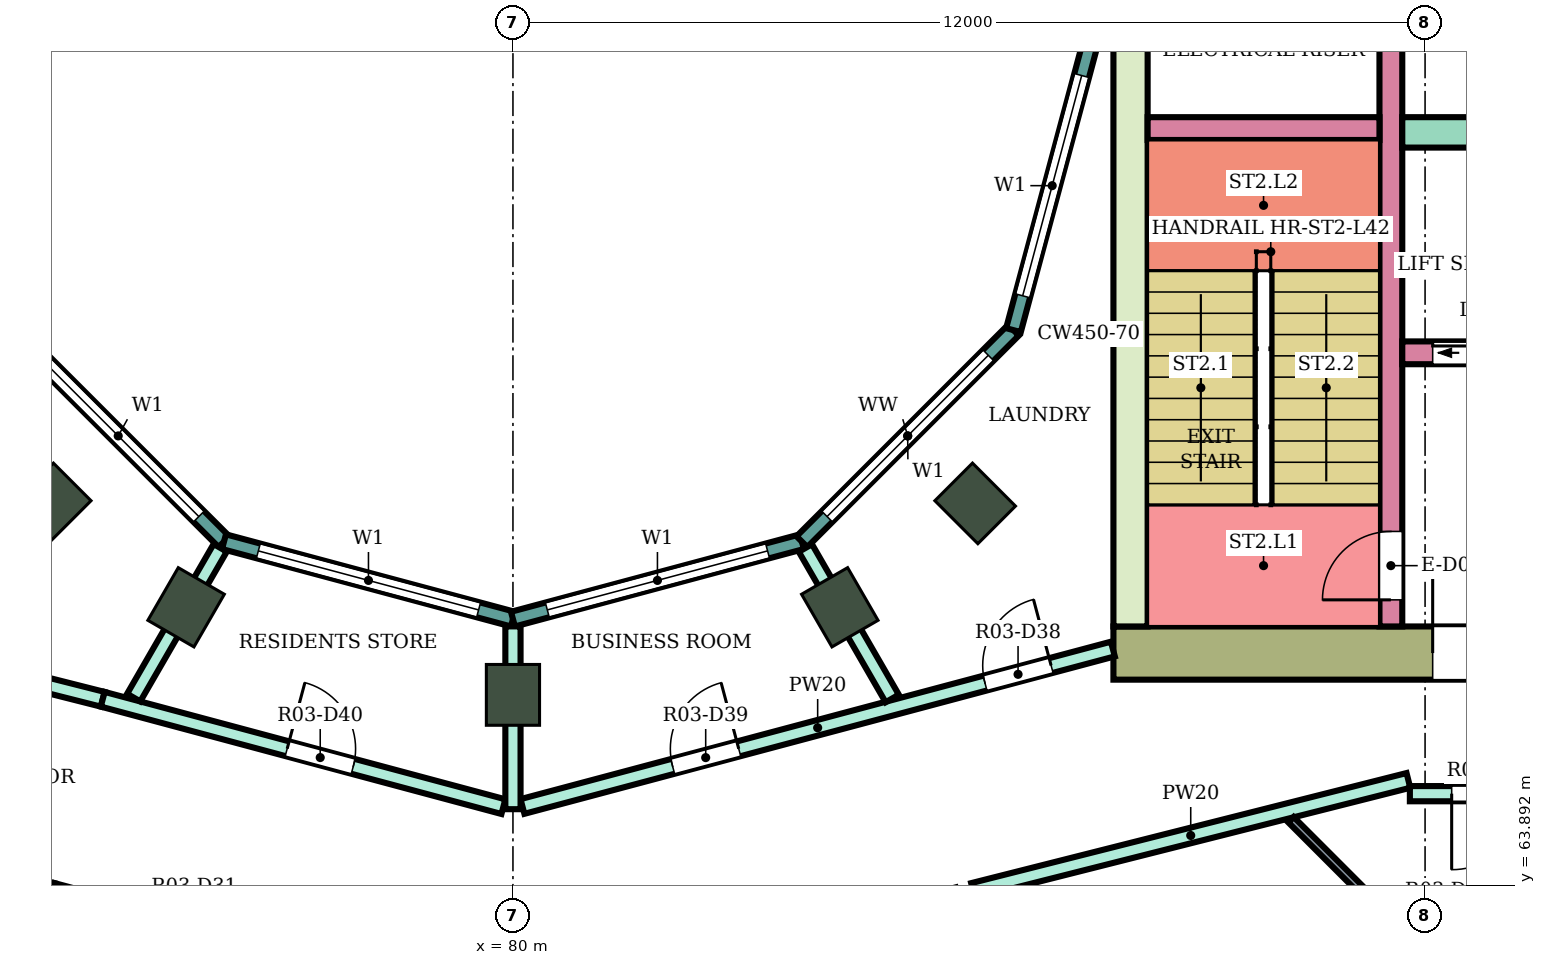
"""IFC4 building model, lengths in metres.
Left out: names, types, materials, properties, quantities, classifications, styles, units other than length and angle.
Written with IfcOpenShell. Run it as: python <this file> out.ifc"""

import sys

from ifc_helpers import new_model, si_unit, direction, frame, frame_2d, origin, origin_2d, place, context, subcontext, project, spatial, rectangle, extrude, element, fill, save


model = new_model("IFC4")
c1 = context("Model", 3, precision=1e-05, world=origin(), true_north=direction((0.0, 1.0)))
c2 = subcontext(c1, "Body", "Model", "MODEL_VIEW")
j1 = project(units=[si_unit("LENGTHUNIT", "METRE"), si_unit("PLANEANGLEUNIT", "RADIAN")], contexts=[c1])
p1 = place(None, origin())
s1 = spatial("IfcSite", under=j1, at=p1, CompositionType="ELEMENT")
p2 = place(p1, origin())
s2 = spatial("IfcBuilding", under=s1, at=p2, CompositionType="ELEMENT")
p3 = place(p2, frame((0.0, 0.0, 182.3)))
s3 = spatial("IfcBuildingStorey", under=s2, at=p3, CompositionType="ELEMENT", Elevation=182.3)
for number, where, z_axis, x_axis in (
    (1, (73.919, 68.919, 0.0), (0.0, 0.0, 1.0), (-0.707, -0.707, 0.0)),
    (2, (75.7, 67.552, 0.0), (0.0, 0.0, 1.0), (-0.5, -0.866, 0.0)),
    (3, (80.0, 66.4, 0.0), (0.0, 0.0, 1.0), (0.0, -1.0, 0.0)),
    (4, (84.3, 67.552, 0.0), (0.0, 0.0, 1.0), (0.5, -0.866, 0.0)),
    (5, (86.081, 68.919, 0.0), (0.0, 0.0, 1.0), (0.707, -0.707, 0.0)),
):
    element("IfcColumn", number, at=place(p3, frame(where, z_axis=z_axis, x_axis=x_axis)), inside=s3, PredefinedType="COLUMN", context=c2, shape_type="SweptSolid", body=[
        extrude(rectangle(XDim=0.8, YDim=0.7, at=origin_2d()), origin(), (0.0, 0.0, 1.0), 4.1),
    ])
p4 = place(p3, frame((87.9, 66.95, 0.0), z_axis=(0.0, 0.0, 1.0), x_axis=(1.0, 0.0, 0.0)))
e6 = element("IfcWall", 6, at=p4, inside=s3, PredefinedType="SHEAR", context=c2, shape_type="SweptSolid", body=[
    extrude(rectangle(XDim=14.8, YDim=0.7, at=frame_2d((7.4, 0.0))), origin(), (0.0, 0.0, 1.0), 3.78),
])
p5 = place(p4, frame((4.2, 0.0, 0.0)))
e7 = element("IfcOpeningElement", 7, at=p5, cuts=e6, PredefinedType="OPENING", context=c2, shape_type="SweptSolid", body=[
    extrude(rectangle(XDim=2.4, YDim=2.4, at=frame_2d((1.2, 1.2))), frame((0.0, 0.36, 0.0), z_axis=(0.0, -1.0, 0.0), x_axis=(1.0, 0.0, 0.0)), (0.0, 0.0, 1.0), 0.72),
])
p6 = place(p3, frame((88.125, 67.3, 0.0), z_axis=(0.0, 0.0, 1.0), x_axis=(0.0, 1.0, 0.0)))
e8 = element("IfcWall", 8, at=p6, inside=s3, PredefinedType="SHEAR", context=c2, shape_type="SweptSolid", body=[
    extrude(rectangle(XDim=7.7, YDim=0.45, at=frame_2d((3.85, 0.0))), origin(), (0.0, 0.0, 1.0), 3.78),
])
p7 = place(p3, frame((91.55, 67.3, 0.0), z_axis=(0.0, 0.0, 1.0), x_axis=(0.0, 1.0, 0.0)))
e9 = element("IfcWall", 9, at=p7, inside=s3, PredefinedType="SHEAR", context=c2, shape_type="SweptSolid", body=[
    extrude(rectangle(XDim=7.7, YDim=0.3, at=frame_2d((3.85, 0.0))), origin(), (0.0, 0.0, 1.0), 3.78),
])
p8 = place(p7, frame((0.35, 0.0, 0.0)))
e10 = element("IfcOpeningElement", 10, at=p8, cuts=e9, PredefinedType="OPENING", context=c2, shape_type="SweptSolid", body=[
    extrude(rectangle(XDim=0.9, YDim=2.1, at=frame_2d((0.45, 1.05))), frame((0.0, 0.16, 0.0), z_axis=(0.0, -1.0, 0.0), x_axis=(1.0, 0.0, 0.0)), (0.0, 0.0, 1.0), 0.32),
])
p9 = place(p3, frame((88.35, 73.85, 0.0), z_axis=(0.0, 0.0, 1.0), x_axis=(1.0, 0.0, 0.0)))
e11 = element("IfcWall", 11, at=p9, inside=s3, PredefinedType="SHEAR", context=c2, shape_type="SweptSolid", body=[
    extrude(rectangle(XDim=3.05, YDim=0.3, at=frame_2d((1.525, 0.0))), origin(), (0.0, 0.0, 1.0), 3.78),
])
p10 = place(p3, frame((91.7, 73.8, 0.0), z_axis=(0.0, 0.0, 1.0), x_axis=(1.0, 0.0, 0.0)))
e12 = element("IfcWall", 12, at=p10, inside=s3, PredefinedType="SHEAR", context=c2, shape_type="SweptSolid", body=[
    extrude(rectangle(XDim=11.0, YDim=0.4, at=frame_2d((5.5, 0.0))), origin(), (0.0, 0.0, 1.0), 3.78),
])
p11 = place(p3, frame((91.7, 70.9, 0.0), z_axis=(0.0, 0.0, 1.0), x_axis=(1.0, 0.0, 0.0)))
e13 = element("IfcWall", 13, at=p11, inside=s3, PredefinedType="SHEAR", context=c2, shape_type="SweptSolid", body=[
    extrude(rectangle(XDim=11.0, YDim=0.3, at=frame_2d((5.5, 0.0))), origin(), (0.0, 0.0, 1.0), 3.78),
])
p12 = place(p11, frame((0.4, 0.0, 0.0)))
e14 = element("IfcOpeningElement", 14, at=p12, cuts=e13, PredefinedType="OPENING", context=c2, shape_type="SweptSolid", body=[
    extrude(rectangle(XDim=1.4, YDim=2.1, at=frame_2d((0.7, 1.05))), frame((0.0, 0.16, 0.0), z_axis=(0.0, -1.0, 0.0), x_axis=(1.0, 0.0, 0.0)), (0.0, 0.0, 1.0), 0.32),
])
p13 = place(p11, frame((3.0, 0.0, 0.0)))
e15 = element("IfcOpeningElement", 15, at=p13, cuts=e13, PredefinedType="OPENING", context=c2, shape_type="SweptSolid", body=[
    extrude(rectangle(XDim=1.2, YDim=2.1, at=frame_2d((0.6, 1.05))), frame((0.0, 0.16, 0.0), z_axis=(0.0, -1.0, 0.0), x_axis=(1.0, 0.0, 0.0)), (0.0, 0.0, 1.0), 0.32),
])
p14 = place(p11, frame((5.55, 0.0, 0.0)))
e16 = element("IfcOpeningElement", 16, at=p14, cuts=e13, PredefinedType="OPENING", context=c2, shape_type="SweptSolid", body=[
    extrude(rectangle(XDim=0.9, YDim=2.1, at=frame_2d((0.45, 1.05))), frame((0.0, 0.16, 0.0), z_axis=(0.0, -1.0, 0.0), x_axis=(1.0, 0.0, 0.0)), (0.0, 0.0, 1.0), 0.32),
])
p15 = place(p11, frame((7.55, 0.0, 0.0)))
e17 = element("IfcOpeningElement", 17, at=p15, cuts=e13, PredefinedType="OPENING", context=c2, shape_type="SweptSolid", body=[
    extrude(rectangle(XDim=0.9, YDim=2.1, at=frame_2d((0.45, 1.05))), frame((0.0, 0.16, 0.0), z_axis=(0.0, -1.0, 0.0), x_axis=(1.0, 0.0, 0.0)), (0.0, 0.0, 1.0), 0.32),
])
p16 = place(p11, frame((9.55, 0.0, 0.0)))
e18 = element("IfcOpeningElement", 18, at=p16, cuts=e13, PredefinedType="OPENING", context=c2, shape_type="SweptSolid", body=[
    extrude(rectangle(XDim=0.9, YDim=2.1, at=frame_2d((0.45, 1.05))), frame((0.0, 0.16, 0.0), z_axis=(0.0, -1.0, 0.0), x_axis=(1.0, 0.0, 0.0)), (0.0, 0.0, 1.0), 0.32),
])
p17 = place(p3, frame((73.415, 71.198, 0.0), z_axis=(0.0, 0.0, 1.0), x_axis=(0.707106781187, -0.707106781187, 0.0)))
e19 = element("IfcWall", 19, at=p17, inside=s3, PredefinedType="NOTDEFINED", context=c2, shape_type="SweptSolid", body=[
    extrude(rectangle(XDim=3.936, YDim=0.2, at=frame_2d((1.968, 0.0))), origin(), (0.0, 0.0, 1.0), 4.1),
])
p18 = place(p17, frame((0.468, 0.0, 0.9)))
e20 = element("IfcOpeningElement", 20, at=p18, cuts=e19, PredefinedType="OPENING", context=c2, shape_type="SweptSolid", body=[
    extrude(rectangle(XDim=3.0, YDim=2.3, at=frame_2d((1.5, 1.15))), frame((0.0, 0.11, 0.0), z_axis=(0.0, -1.0, 0.0), x_axis=(1.0, 0.0, 0.0)), (0.0, 0.0, 1.0), 0.22),
])
p19 = place(p3, frame((76.198, 68.415, 0.0), z_axis=(0.0, 0.0, 1.0), x_axis=(0.965933654434, -0.258789828301, 0.0)))
e21 = element("IfcWall", 21, at=p19, inside=s3, PredefinedType="NOTDEFINED", context=c2, shape_type="SweptSolid", body=[
    extrude(rectangle(XDim=3.936, YDim=0.2, at=frame_2d((1.968, 0.0))), origin(), (0.0, 0.0, 1.0), 4.1),
])
p20 = place(p19, frame((0.468, 0.0, 0.9)))
e22 = element("IfcOpeningElement", 22, at=p20, cuts=e21, PredefinedType="OPENING", context=c2, shape_type="SweptSolid", body=[
    extrude(rectangle(XDim=3.0, YDim=2.3, at=frame_2d((1.5, 1.15))), frame((0.0, 0.11, 0.0), z_axis=(0.0, -1.0, 0.0), x_axis=(1.0, 0.0, 0.0)), (0.0, 0.0, 1.0), 0.22),
])
p21 = place(p3, frame((80.0, 67.396, 0.0), z_axis=(0.0, 0.0, 1.0), x_axis=(0.965933654434, 0.258789828301, 0.0)))
e23 = element("IfcWall", 23, at=p21, inside=s3, PredefinedType="NOTDEFINED", context=c2, shape_type="SweptSolid", body=[
    extrude(rectangle(XDim=3.936, YDim=0.2, at=frame_2d((1.968, 0.0))), origin(), (0.0, 0.0, 1.0), 4.1),
])
p22 = place(p21, frame((0.468, 0.0, 0.9)))
e24 = element("IfcOpeningElement", 24, at=p22, cuts=e23, PredefinedType="OPENING", context=c2, shape_type="SweptSolid", body=[
    extrude(rectangle(XDim=3.0, YDim=2.3, at=frame_2d((1.5, 1.15))), frame((0.0, 0.11, 0.0), z_axis=(0.0, -1.0, 0.0), x_axis=(1.0, 0.0, 0.0)), (0.0, 0.0, 1.0), 0.22),
])
p23 = place(p3, frame((83.802, 68.415, 0.0), z_axis=(0.0, 0.0, 1.0), x_axis=(0.707106781187, 0.707106781187, 0.0)))
e25 = element("IfcWall", 25, at=p23, inside=s3, PredefinedType="NOTDEFINED", context=c2, shape_type="SweptSolid", body=[
    extrude(rectangle(XDim=3.936, YDim=0.2, at=frame_2d((1.968, 0.0))), origin(), (0.0, 0.0, 1.0), 4.1),
])
p24 = place(p23, frame((0.468, 0.0, 0.9)))
e26 = element("IfcOpeningElement", 26, at=p24, cuts=e25, PredefinedType="OPENING", context=c2, shape_type="SweptSolid", body=[
    extrude(rectangle(XDim=3.0, YDim=2.3, at=frame_2d((1.5, 1.15))), frame((0.0, 0.11, 0.0), z_axis=(0.0, -1.0, 0.0), x_axis=(1.0, 0.0, 0.0)), (0.0, 0.0, 1.0), 0.22),
])
p25 = place(p3, frame((86.585, 71.198, 0.0), z_axis=(0.0, 0.0, 1.0), x_axis=(0.258789828301, 0.965933654434, 0.0)))
e27 = element("IfcWall", 27, at=p25, inside=s3, PredefinedType="NOTDEFINED", context=c2, shape_type="SweptSolid", body=[
    extrude(rectangle(XDim=3.936, YDim=0.2, at=frame_2d((1.968, 0.0))), origin(), (0.0, 0.0, 1.0), 4.1),
])
p26 = place(p25, frame((0.468, 0.0, 0.9)))
e28 = element("IfcOpeningElement", 28, at=p26, cuts=e27, PredefinedType="OPENING", context=c2, shape_type="SweptSolid", body=[
    extrude(rectangle(XDim=3.0, YDim=2.3, at=frame_2d((1.5, 1.15))), frame((0.0, 0.11, 0.0), z_axis=(0.0, -1.0, 0.0), x_axis=(1.0, 0.0, 0.0)), (0.0, 0.0, 1.0), 0.22),
])
p27 = place(p3, frame((69.899, 64.85, 0.0), z_axis=(0.0, 0.0, 1.0), x_axis=(0.969429930153, -0.245368316057, 0.0)))
e29 = element("IfcWall", 29, at=p27, inside=s3, PredefinedType="PARTITIONING", context=c2, shape_type="SweptSolid", body=[
    extrude(rectangle(XDim=4.176, YDim=0.2, at=frame_2d((2.088, 0.0))), origin(), (0.0, 0.0, 1.0), 3.65),
])
p28 = place(p3, frame((72.1, 66.975, 0.0), z_axis=(0.0, 0.0, 1.0), x_axis=(0.969471314457, -0.245204752086, 0.0)))
e30 = element("IfcWall", 30, at=p28, inside=s3, PredefinedType="PARTITIONING", context=c2, shape_type="SweptSolid", body=[
    extrude(rectangle(XDim=2.582, YDim=0.2, at=frame_2d((1.291, 0.0))), origin(), (0.0, 0.0, 1.0), 3.65),
])
p29 = place(p28, frame((0.841, 0.0, 0.0)))
e31 = element("IfcOpeningElement", 31, at=p29, cuts=e30, PredefinedType="OPENING", context=c2, shape_type="SweptSolid", body=[
    extrude(rectangle(XDim=0.9, YDim=2.1, at=frame_2d((0.45, 1.05))), frame((0.0, 0.11, 0.0), z_axis=(0.0, -1.0, 0.0), x_axis=(1.0, 0.0, 0.0)), (0.0, 0.0, 1.0), 0.22),
])
p30 = place(p3, frame((73.947, 63.826, 0.0), z_axis=(0.0, 0.0, 1.0), x_axis=(0.965898432367, -0.258921258979, 0.0)))
e32 = element("IfcWall", 32, at=p30, inside=s3, PredefinedType="PARTITIONING", context=c2, shape_type="SweptSolid", body=[
    extrude(rectangle(XDim=6.217, YDim=0.2, at=frame_2d((3.108, 0.0))), origin(), (0.0, 0.0, 1.0), 3.65),
])
p31 = place(p30, frame((1.424, 0.0, 0.0)))
e33 = element("IfcOpeningElement", 33, at=p31, cuts=e32, PredefinedType="OPENING", context=c2, shape_type="SweptSolid", body=[
    extrude(rectangle(XDim=1.0, YDim=2.1, at=frame_2d((0.5, 1.05))), frame((0.0, 0.11, 0.0), z_axis=(0.0, -1.0, 0.0), x_axis=(1.0, 0.0, 0.0)), (0.0, 0.0, 1.0), 0.22),
])
p32 = place(p3, frame((74.603, 66.342, 0.0), z_axis=(0.0, 0.0, 1.0), x_axis=(0.965920893652, -0.258837453254, 0.0)))
e34 = element("IfcWall", 34, at=p32, inside=s3, PredefinedType="PARTITIONING", context=c2, shape_type="SweptSolid", body=[
    extrude(rectangle(XDim=5.458, YDim=0.2, at=frame_2d((2.729, 0.0))), origin(), (0.0, 0.0, 1.0), 3.65),
])
p33 = place(p32, frame((2.512, 0.0, 0.0)))
e35 = element("IfcOpeningElement", 35, at=p33, cuts=e34, PredefinedType="OPENING", context=c2, shape_type="SweptSolid", body=[
    extrude(rectangle(XDim=0.9, YDim=2.1, at=frame_2d((0.45, 1.05))), frame((0.0, 0.11, 0.0), z_axis=(0.0, -1.0, 0.0), x_axis=(1.0, 0.0, 0.0)), (0.0, 0.0, 1.0), 0.22),
])
p34 = place(p3, frame((75.01, 66.364, 0.0), z_axis=(0.0, 0.0, 1.0), x_axis=(0.500097042406, 0.865969369075, 0.0)))
e36 = element("IfcWall", 36, at=p34, inside=s3, PredefinedType="PARTITIONING", context=c2, shape_type="SweptSolid", body=[
    extrude(rectangle(XDim=2.275, YDim=0.2, at=frame_2d((1.138, 0.0))), origin(), (0.0, 0.0, 1.0), 3.65),
])
p35 = place(p3, frame((80.125, 64.932, 0.0), z_axis=(0.0, 0.0, 1.0), x_axis=(0.966236955806, 0.257655089674, 0.0)))
e37 = element("IfcWall", 37, at=p35, inside=s3, PredefinedType="PARTITIONING", context=c2, shape_type="SweptSolid", body=[
    extrude(rectangle(XDim=8.039, YDim=0.2, at=frame_2d((4.02, 0.0))), origin(), (0.0, 0.0, 1.0), 3.65),
])
p36 = place(p35, frame((6.298, 0.0, 0.0)))
e38 = element("IfcOpeningElement", 38, at=p36, cuts=e37, PredefinedType="OPENING", context=c2, shape_type="SweptSolid", body=[
    extrude(rectangle(XDim=0.9, YDim=2.1, at=frame_2d((0.45, 1.05))), frame((0.0, 0.11, 0.0), z_axis=(0.0, -1.0, 0.0), x_axis=(1.0, 0.0, 0.0)), (0.0, 0.0, 1.0), 0.22),
])
p37 = place(p35, frame((2.045, 0.0, 0.0)))
e39 = element("IfcOpeningElement", 39, at=p37, cuts=e37, PredefinedType="OPENING", context=c2, shape_type="SweptSolid", body=[
    extrude(rectangle(XDim=0.9, YDim=2.1, at=frame_2d((0.45, 1.05))), frame((0.0, 0.11, 0.0), z_axis=(0.0, -1.0, 0.0), x_axis=(1.0, 0.0, 0.0)), (0.0, 0.0, 1.0), 0.22),
])
p38 = place(p3, frame((80.0, 64.896, 0.0), z_axis=(0.0, 0.0, 1.0), x_axis=(0.0, 1.0, 0.0)))
e40 = element("IfcWall", 40, at=p38, inside=s3, PredefinedType="PARTITIONING", context=c2, shape_type="SweptSolid", body=[
    extrude(rectangle(XDim=2.405, YDim=0.2, at=frame_2d((1.203, 0.0))), origin(), (0.0, 0.0, 1.0), 3.65),
])
p39 = place(p3, frame((83.847, 68.332, 0.0), z_axis=(0.0, 0.0, 1.0), x_axis=(0.499953638813, -0.866052168773, 0.0)))
e41 = element("IfcWall", 41, at=p39, inside=s3, PredefinedType="PARTITIONING", context=c2, shape_type="SweptSolid", body=[
    extrude(rectangle(XDim=2.285, YDim=0.2, at=frame_2d((1.143, 0.0))), origin(), (0.0, 0.0, 1.0), 3.65),
])
p40 = place(p3, frame((86.053, 63.826, 0.0), z_axis=(0.0, 0.0, 1.0), x_axis=(0.969490004987, 0.245130843083, 0.0)))
e42 = element("IfcWall", 42, at=p40, inside=s3, PredefinedType="PARTITIONING", context=c2, shape_type="SweptSolid", body=[
    extrude(rectangle(XDim=5.908, YDim=0.2, at=frame_2d((2.954, 0.0))), origin(), (0.0, 0.0, 1.0), 3.65),
])
p41 = place(p3, frame((91.8, 65.1, 0.0), z_axis=(0.0, 0.0, 1.0), x_axis=(1.0, 0.0, 0.0)))
e43 = element("IfcWall", 43, at=p41, inside=s3, PredefinedType="PARTITIONING", context=c2, shape_type="SweptSolid", body=[
    extrude(rectangle(XDim=3.0, YDim=0.2, at=frame_2d((1.5, 0.0))), origin(), (0.0, 0.0, 1.0), 3.65),
])
p42 = place(p41, frame((0.55, 0.0, 0.0)))
e44 = element("IfcOpeningElement", 44, at=p42, cuts=e43, PredefinedType="OPENING", context=c2, shape_type="SweptSolid", body=[
    extrude(rectangle(XDim=1.0, YDim=2.1, at=frame_2d((0.5, 1.05))), frame((0.0, 0.11, 0.0), z_axis=(0.0, -1.0, 0.0), x_axis=(1.0, 0.0, 0.0)), (0.0, 0.0, 1.0), 0.22),
])
p43 = place(p3, frame((90.236, 64.758, 0.0), z_axis=(0.0, 0.0, 1.0), x_axis=(0.706924769926, -0.707288745609, 0.0)))
e45 = element("IfcWall", 45, at=p43, inside=s3, PredefinedType="PARTITIONING", context=c2, shape_type="SweptSolid", body=[
    extrude(rectangle(XDim=8.72, YDim=0.1, at=frame_2d((4.36, 0.0))), origin(), (0.0, 0.0, 1.0), 3.65),
])
p44 = place(p43, frame((6.114, 0.0, 0.0)))
e46 = element("IfcOpeningElement", 46, at=p44, cuts=e45, PredefinedType="OPENING", context=c2, shape_type="SweptSolid", body=[
    extrude(rectangle(XDim=0.9, YDim=2.1, at=frame_2d((0.45, 1.05))), frame((0.0, 0.06, 0.0), z_axis=(0.0, -1.0, 0.0), x_axis=(1.0, 0.0, 0.0)), (0.0, 0.0, 1.0), 0.12),
])
p45 = place(p43, frame((1.722, 0.0, 0.0)))
e47 = element("IfcOpeningElement", 47, at=p45, cuts=e45, PredefinedType="OPENING", context=c2, shape_type="SweptSolid", body=[
    extrude(rectangle(XDim=0.8, YDim=2.1, at=frame_2d((0.4, 1.05))), frame((0.0, 0.06, 0.0), z_axis=(0.0, -1.0, 0.0), x_axis=(1.0, 0.0, 0.0)), (0.0, 0.0, 1.0), 0.12),
])
p46 = place(p18, origin())
e48 = element("IfcWindow", 48, at=p46, inside=s3, PartitioningType="SINGLE_PANEL", PredefinedType="WINDOW", context=c2, shape_type="SweptSolid", body=[
    extrude(rectangle(XDim=3.0, YDim=2.3, at=frame_2d((1.5, 1.15))), frame((0.0, 0.03, 0.0), z_axis=(0.0, -1.0, 0.0), x_axis=(1.0, 0.0, 0.0)), (0.0, 0.0, 1.0), 0.06),
])
fill(e20, e48)
p47 = place(p20, origin())
e49 = element("IfcWindow", 49, at=p47, inside=s3, PartitioningType="SINGLE_PANEL", PredefinedType="WINDOW", context=c2, shape_type="SweptSolid", body=[
    extrude(rectangle(XDim=3.0, YDim=2.3, at=frame_2d((1.5, 1.15))), frame((0.0, 0.03, 0.0), z_axis=(0.0, -1.0, 0.0), x_axis=(1.0, 0.0, 0.0)), (0.0, 0.0, 1.0), 0.06),
])
fill(e22, e49)
p48 = place(p22, origin())
e50 = element("IfcWindow", 50, at=p48, inside=s3, PartitioningType="SINGLE_PANEL", PredefinedType="WINDOW", context=c2, shape_type="SweptSolid", body=[
    extrude(rectangle(XDim=3.0, YDim=2.3, at=frame_2d((1.5, 1.15))), frame((0.0, 0.03, 0.0), z_axis=(0.0, -1.0, 0.0), x_axis=(1.0, 0.0, 0.0)), (0.0, 0.0, 1.0), 0.06),
])
fill(e24, e50)
p49 = place(p24, origin())
e51 = element("IfcWindow", 51, at=p49, inside=s3, PartitioningType="SINGLE_PANEL", PredefinedType="WINDOW", context=c2, shape_type="SweptSolid", body=[
    extrude(rectangle(XDim=3.0, YDim=2.3, at=frame_2d((1.5, 1.15))), frame((0.0, 0.03, 0.0), z_axis=(0.0, -1.0, 0.0), x_axis=(1.0, 0.0, 0.0)), (0.0, 0.0, 1.0), 0.06),
])
fill(e26, e51)
p50 = place(p26, origin())
e52 = element("IfcWindow", 52, at=p50, inside=s3, PartitioningType="SINGLE_PANEL", PredefinedType="WINDOW", context=c2, shape_type="SweptSolid", body=[
    extrude(rectangle(XDim=3.0, YDim=2.3, at=frame_2d((1.5, 1.15))), frame((0.0, 0.03, 0.0), z_axis=(0.0, -1.0, 0.0), x_axis=(1.0, 0.0, 0.0)), (0.0, 0.0, 1.0), 0.06),
])
fill(e28, e52)
p51 = place(p42, frame((1.0, 0.0, 0.0), z_axis=(0.0, 0.0, 1.0), x_axis=(-1.0, 0.0, 0.0)))
e53 = element("IfcDoor", 53, at=p51, inside=s3, OperationType="SINGLE_SWING_RIGHT", PredefinedType="DOOR", context=c2, shape_type="SweptSolid", body=[
    extrude(rectangle(XDim=1.0, YDim=2.1, at=frame_2d((0.5, 1.05))), frame((0.0, 0.025, 0.0), z_axis=(0.0, -1.0, 0.0), x_axis=(1.0, 0.0, 0.0)), (0.0, 0.0, 1.0), 0.05),
])
fill(e44, e53)
p52 = place(p36, origin())
e54 = element("IfcDoor", 54, at=p52, inside=s3, OperationType="SINGLE_SWING_RIGHT", PredefinedType="DOOR", context=c2, shape_type="SweptSolid", body=[
    extrude(rectangle(XDim=0.9, YDim=2.1, at=frame_2d((0.45, 1.05))), frame((0.0, 0.025, 0.0), z_axis=(0.0, -1.0, 0.0), x_axis=(1.0, 0.0, 0.0)), (0.0, 0.0, 1.0), 0.05),
])
fill(e38, e54)
p53 = place(p37, origin())
e55 = element("IfcDoor", 55, at=p53, inside=s3, OperationType="SINGLE_SWING_RIGHT", PredefinedType="DOOR", context=c2, shape_type="SweptSolid", body=[
    extrude(rectangle(XDim=0.9, YDim=2.1, at=frame_2d((0.45, 1.05))), frame((0.0, 0.025, 0.0), z_axis=(0.0, -1.0, 0.0), x_axis=(1.0, 0.0, 0.0)), (0.0, 0.0, 1.0), 0.05),
])
fill(e39, e55)
p54 = place(p33, origin())
e56 = element("IfcDoor", 56, at=p54, inside=s3, OperationType="SINGLE_SWING_LEFT", PredefinedType="DOOR", context=c2, shape_type="SweptSolid", body=[
    extrude(rectangle(XDim=0.9, YDim=2.1, at=frame_2d((0.45, 1.05))), frame((0.0, 0.025, 0.0), z_axis=(0.0, -1.0, 0.0), x_axis=(1.0, 0.0, 0.0)), (0.0, 0.0, 1.0), 0.05),
])
fill(e35, e56)
p55 = place(p8, origin())
e57 = element("IfcDoor", 57, at=p55, inside=s3, OperationType="SINGLE_SWING_LEFT", PredefinedType="DOOR", context=c2, shape_type="SweptSolid", body=[
    extrude(rectangle(XDim=0.9, YDim=2.1, at=frame_2d((0.45, 1.05))), frame((0.0, 0.025, 0.0), z_axis=(0.0, -1.0, 0.0), x_axis=(1.0, 0.0, 0.0)), (0.0, 0.0, 1.0), 0.05),
])
fill(e10, e57)
p56 = place(p12, origin())
e58 = element("IfcDoor", 58, at=p56, inside=s3, OperationType="DOUBLE_DOOR_SLIDING", PredefinedType="DOOR", context=c2, shape_type="SweptSolid", body=[
    extrude(rectangle(XDim=1.4, YDim=2.1, at=frame_2d((0.7, 1.05))), frame((0.0, 0.025, 0.0), z_axis=(0.0, -1.0, 0.0), x_axis=(1.0, 0.0, 0.0)), (0.0, 0.0, 1.0), 0.05),
])
fill(e14, e58)
p57 = place(p5, origin())
e59 = element("IfcDoor", 59, at=p57, inside=s3, OperationType="DOUBLE_DOOR_SINGLE_SWING", PredefinedType="DOOR", context=c2, shape_type="SweptSolid", body=[
    extrude(rectangle(XDim=2.4, YDim=2.4, at=frame_2d((1.2, 1.2))), frame((0.0, 0.025, 0.0), z_axis=(0.0, -1.0, 0.0), x_axis=(1.0, 0.0, 0.0)), (0.0, 0.0, 1.0), 0.05),
])
fill(e7, e59)
save(model, sys.argv[1])
